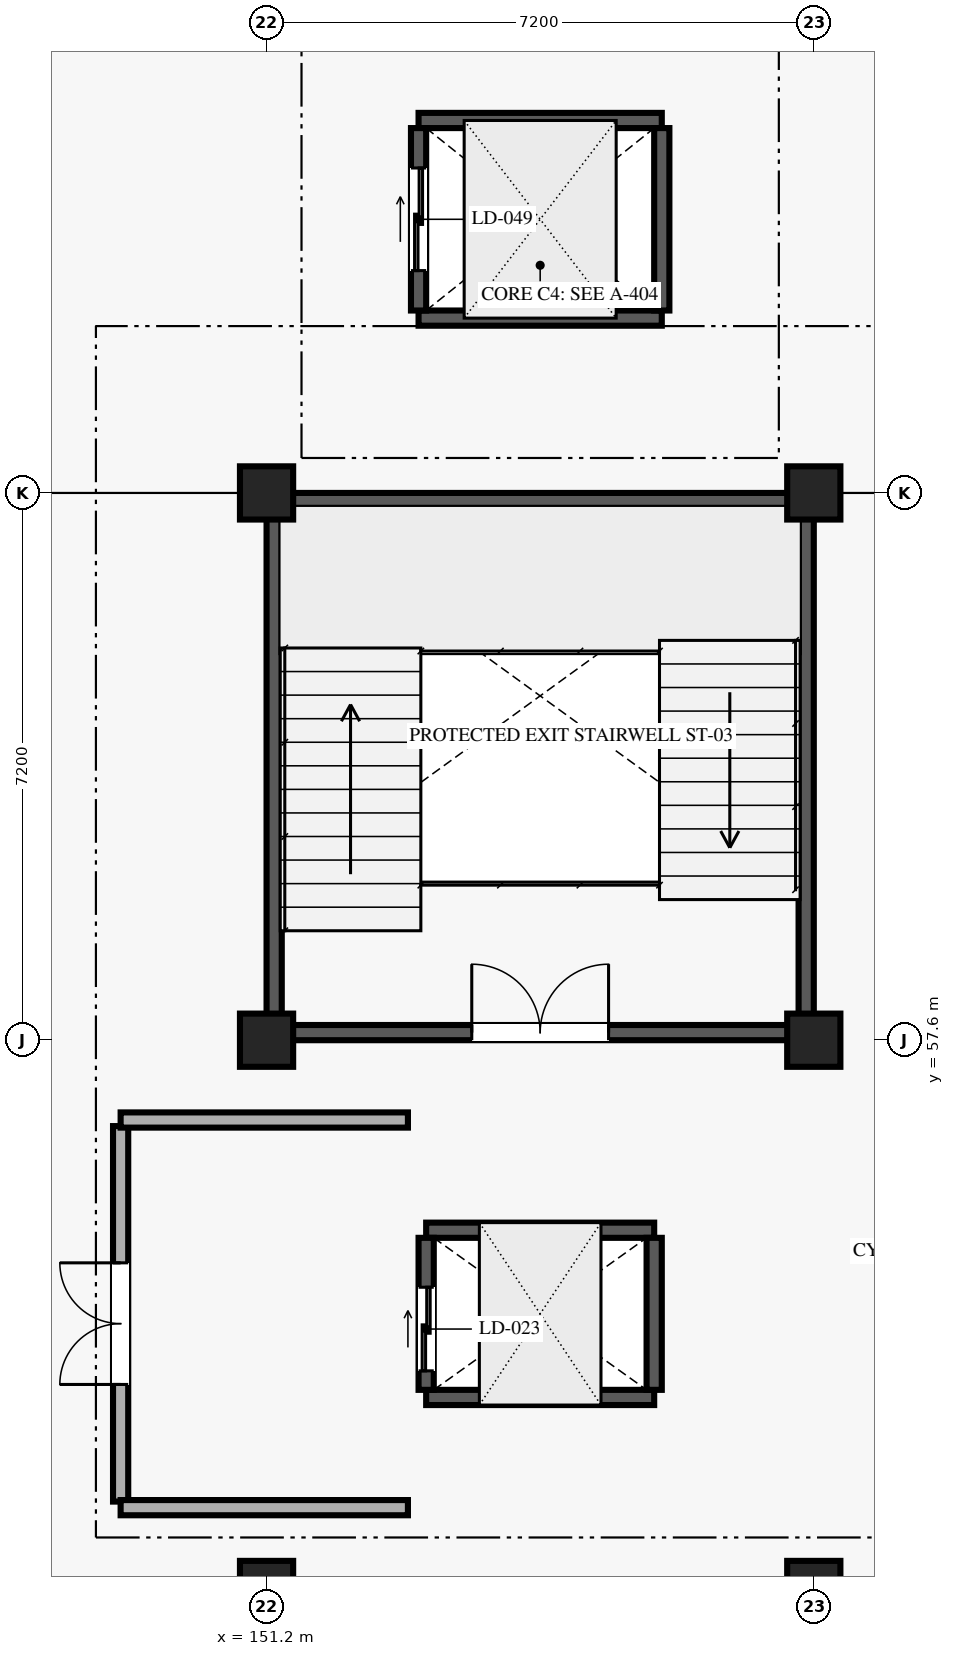
"""IFC4 building model, lengths in metres.
Left out: names, types, materials, properties, quantities, classifications, styles, units other than length and angle.
Written with IfcOpenShell. Run it as: python <this file> out.ifc"""

import sys

from ifc_helpers import new_model, si_unit, direction, frame, frame_2d, origin, origin_2d, place, context, subcontext, project, spatial, rectangle, extrude, element, fill, save


model = new_model("IFC4")
c1 = context("Model", 3, precision=1e-05, world=origin(), true_north=direction((0.0, 1.0)))
c2 = subcontext(c1, "Body", "Model", "MODEL_VIEW")
j1 = project(units=[si_unit("LENGTHUNIT", "METRE"), si_unit("PLANEANGLEUNIT", "RADIAN")], contexts=[c1])
p1 = place(None, origin())
s1 = spatial("IfcSite", under=j1, at=p1, CompositionType="ELEMENT")
p2 = place(p1, origin())
s2 = spatial("IfcBuilding", under=s1, at=p2, CompositionType="ELEMENT")
p3 = place(p2, frame((0.0, 0.0, 13.5)))
s3 = spatial("IfcBuildingStorey", under=s2, at=p3, CompositionType="ELEMENT", Elevation=13.5)
for number, where, z_axis, x_axis in (
    (1, (151.2, 50.4, 0.0), (0.0, 0.0, 1.0), (1.0, 0.0, 0.0)),
    (2, (151.2, 57.6, 0.0), (0.0, 0.0, 1.0), (1.0, 0.0, 0.0)),
    (3, (151.2, 64.8, 0.0), (0.0, 0.0, 1.0), (1.0, 0.0, 0.0)),
    (4, (158.4, 50.4, 0.0), (0.0, 0.0, 1.0), (1.0, 0.0, 0.0)),
    (5, (158.4, 57.6, 0.0), (0.0, 0.0, 1.0), (1.0, 0.0, 0.0)),
    (6, (158.4, 64.8, 0.0), (0.0, 0.0, 1.0), (1.0, 0.0, 0.0)),
):
    element("IfcColumn", number, at=place(p3, frame(where, z_axis=z_axis, x_axis=x_axis)), inside=s3, PredefinedType="COLUMN", context=c2, shape_type="SweptSolid", body=[
        extrude(rectangle(XDim=0.7, YDim=0.7, at=origin_2d()), origin(), (0.0, 0.0, 1.0), 4.05),
    ])
p4 = place(p3, frame((151.4, 57.7, 0.0), z_axis=(0.0, 0.0, 1.0), x_axis=(1.0, 0.0, 0.0)))
e7 = element("IfcWall", 7, at=p4, inside=s3, PredefinedType="SHEAR", context=c2, shape_type="SweptSolid", body=[
    extrude(rectangle(XDim=6.8, YDim=0.2, at=frame_2d((3.4, 0.0))), origin(), (0.0, 0.0, 1.0), 3.81),
])
p5 = place(p4, frame((2.5, 0.0, 0.0)))
e8 = element("IfcOpeningElement", 8, at=p5, cuts=e7, PredefinedType="OPENING", context=c2, shape_type="SweptSolid", body=[
    extrude(rectangle(XDim=1.8, YDim=2.2, at=frame_2d((0.9, 1.1))), frame((0.0, 0.11, 0.0), z_axis=(0.0, -1.0, 0.0), x_axis=(1.0, 0.0, 0.0)), (0.0, 0.0, 1.0), 0.22),
])
for number, where, z_axis, x_axis in (
    (9, (151.4, 64.7, 0.0), (0.0, 0.0, 1.0), (1.0, 0.0, 0.0)),
    (10, (151.3, 57.8, 0.0), (0.0, 0.0, 1.0), (0.0, 1.0, 0.0)),
    (11, (158.3, 57.8, 0.0), (0.0, 0.0, 1.0), (0.0, 1.0, 0.0)),
):
    element("IfcWall", number, at=place(p3, frame(where, z_axis=z_axis, x_axis=x_axis)), inside=s3, PredefinedType="SHEAR", context=c2, shape_type="SweptSolid", body=[
        extrude(rectangle(XDim=6.8, YDim=0.2, at=frame_2d((3.4, 0.0))), origin(), (0.0, 0.0, 1.0), 3.81),
    ])
for number, where, z_axis, x_axis in (
    (12, (153.3, 52.9, 0.0), (0.0, 0.0, 1.0), (1.0, 0.0, 0.0)),
    (13, (153.3, 55.1, 0.0), (0.0, 0.0, 1.0), (1.0, 0.0, 0.0)),
):
    element("IfcWall", number, at=place(p3, frame(where, z_axis=z_axis, x_axis=x_axis)), inside=s3, PredefinedType="SHEAR", context=c2, shape_type="SweptSolid", body=[
        extrude(rectangle(XDim=3.0, YDim=0.2, at=frame_2d((1.5, 0.0))), origin(), (0.0, 0.0, 1.0), 3.81),
    ])
p6 = place(p3, frame((153.3, 53.0, 0.0), z_axis=(0.0, 0.0, 1.0), x_axis=(0.0, 1.0, 0.0)))
e14 = element("IfcWall", 14, at=p6, inside=s3, PredefinedType="SHEAR", context=c2, shape_type="SweptSolid", body=[
    extrude(rectangle(XDim=2.0, YDim=0.2, at=frame_2d((1.0, 0.0))), origin(), (0.0, 0.0, 1.0), 3.81),
])
p7 = place(p6, frame((0.25, 0.0, 0.0)))
e15 = element("IfcOpeningElement", 15, at=p7, cuts=e14, PredefinedType="OPENING", context=c2, shape_type="SweptSolid", body=[
    extrude(rectangle(XDim=1.1, YDim=2.15, at=frame_2d((0.55, 1.075))), frame((0.0, 0.11, 0.0), z_axis=(0.0, -1.0, 0.0), x_axis=(1.0, 0.0, 0.0)), (0.0, 0.0, 1.0), 0.22),
])
p8 = place(p3, frame((156.3, 53.0, 0.0), z_axis=(0.0, 0.0, 1.0), x_axis=(0.0, 1.0, 0.0)))
e16 = element("IfcWall", 16, at=p8, inside=s3, PredefinedType="SHEAR", context=c2, shape_type="SweptSolid", body=[
    extrude(rectangle(XDim=2.0, YDim=0.2, at=frame_2d((1.0, 0.0))), origin(), (0.0, 0.0, 1.0), 3.81),
])
for number, where, z_axis, x_axis in (
    (17, (153.2, 67.1, 0.0), (0.0, 0.0, 1.0), (1.0, 0.0, 0.0)),
    (18, (153.2, 69.7, 0.0), (0.0, 0.0, 1.0), (1.0, 0.0, 0.0)),
):
    element("IfcWall", number, at=place(p3, frame(where, z_axis=z_axis, x_axis=x_axis)), inside=s3, PredefinedType="SHEAR", context=c2, shape_type="SweptSolid", body=[
        extrude(rectangle(XDim=3.2, YDim=0.2, at=frame_2d((1.6, 0.0))), origin(), (0.0, 0.0, 1.0), 3.81),
    ])
p9 = place(p3, frame((153.2, 67.2, 0.0), z_axis=(0.0, 0.0, 1.0), x_axis=(0.0, 1.0, 0.0)))
e19 = element("IfcWall", 19, at=p9, inside=s3, PredefinedType="SHEAR", context=c2, shape_type="SweptSolid", body=[
    extrude(rectangle(XDim=2.4, YDim=0.2, at=frame_2d((1.2, 0.0))), origin(), (0.0, 0.0, 1.0), 3.81),
])
p10 = place(p9, frame((0.525, 0.0, 0.0)))
e20 = element("IfcOpeningElement", 20, at=p10, cuts=e19, PredefinedType="OPENING", context=c2, shape_type="SweptSolid", body=[
    extrude(rectangle(XDim=1.35, YDim=2.2, at=frame_2d((0.675, 1.1))), frame((0.0, 0.11, 0.0), z_axis=(0.0, -1.0, 0.0), x_axis=(1.0, 0.0, 0.0)), (0.0, 0.0, 1.0), 0.22),
])
p11 = place(p3, frame((156.4, 67.2, 0.0), z_axis=(0.0, 0.0, 1.0), x_axis=(0.0, 1.0, 0.0)))
e21 = element("IfcWall", 21, at=p11, inside=s3, PredefinedType="SHEAR", context=c2, shape_type="SweptSolid", body=[
    extrude(rectangle(XDim=2.4, YDim=0.2, at=frame_2d((1.2, 0.0))), origin(), (0.0, 0.0, 1.0), 3.81),
])
p12 = place(p3, frame((149.28, 51.53, 0.0), z_axis=(0.0, 0.0, 1.0), x_axis=(0.0, 1.0, 0.0)))
e22 = element("IfcWall", 22, at=p12, inside=s3, PredefinedType="SOLIDWALL", context=c2, shape_type="SweptSolid", body=[
    extrude(rectangle(XDim=4.94, YDim=0.2, at=frame_2d((2.47, 0.0))), origin(), (0.0, 0.0, 1.0), 3.81),
])
p13 = place(p12, frame((1.541, 0.0, 0.0)))
e23 = element("IfcOpeningElement", 23, at=p13, cuts=e22, PredefinedType="OPENING", context=c2, shape_type="SweptSolid", body=[
    extrude(rectangle(XDim=1.6, YDim=2.2, at=frame_2d((0.8, 1.1))), frame((0.0, 0.11, 0.0), z_axis=(0.0, -1.0, 0.0), x_axis=(1.0, 0.0, 0.0)), (0.0, 0.0, 1.0), 0.22),
])
for number, where, z_axis, x_axis in (
    (24, (149.28, 51.45, 0.0), (0.0, 0.0, 1.0), (1.0, 0.0, 0.0)),
    (25, (149.28, 56.55, 0.0), (0.0, 0.0, 1.0), (1.0, 0.0, 0.0)),
):
    element("IfcWall", number, at=place(p3, frame(where, z_axis=z_axis, x_axis=x_axis)), inside=s3, PredefinedType="SOLIDWALL", context=c2, shape_type="SweptSolid", body=[
        extrude(rectangle(XDim=3.78, YDim=0.2, at=frame_2d((1.89, 0.0))), origin(), (0.0, 0.0, 1.0), 3.81),
    ])
p14 = place(p5, origin())
e26 = element("IfcDoor", 26, at=p14, inside=s3, OperationType="DOUBLE_DOOR_SINGLE_SWING", PredefinedType="DOOR", context=c2, shape_type="SweptSolid", body=[
    extrude(rectangle(XDim=1.8, YDim=2.2, at=frame_2d((0.9, 1.1))), frame((0.0, 0.025, 0.0), z_axis=(0.0, -1.0, 0.0), x_axis=(1.0, 0.0, 0.0)), (0.0, 0.0, 1.0), 0.05),
])
fill(e8, e26)
p15 = place(p7, origin())
e27 = element("IfcDoor", 27, at=p15, inside=s3, OperationType="DOUBLE_DOOR_SLIDING", PredefinedType="DOOR", context=c2, shape_type="SweptSolid", body=[
    extrude(rectangle(XDim=1.1, YDim=2.15, at=frame_2d((0.55, 1.075))), frame((0.0, 0.025, 0.0), z_axis=(0.0, -1.0, 0.0), x_axis=(1.0, 0.0, 0.0)), (0.0, 0.0, 1.0), 0.05),
])
fill(e15, e27)
p16 = place(p10, origin())
e28 = element("IfcDoor", 28, at=p16, inside=s3, OperationType="DOUBLE_DOOR_SLIDING", PredefinedType="DOOR", context=c2, shape_type="SweptSolid", body=[
    extrude(rectangle(XDim=1.35, YDim=2.2, at=frame_2d((0.675, 1.1))), frame((0.0, 0.025, 0.0), z_axis=(0.0, -1.0, 0.0), x_axis=(1.0, 0.0, 0.0)), (0.0, 0.0, 1.0), 0.05),
])
fill(e20, e28)
p17 = place(p13, origin())
e29 = element("IfcDoor", 29, at=p17, inside=s3, OperationType="DOUBLE_DOOR_SINGLE_SWING", PredefinedType="DOOR", context=c2, shape_type="SweptSolid", body=[
    extrude(rectangle(XDim=1.6, YDim=2.2, at=frame_2d((0.8, 1.1))), frame((0.0, 0.025, 0.0), z_axis=(0.0, -1.0, 0.0), x_axis=(1.0, 0.0, 0.0)), (0.0, 0.0, 1.0), 0.05),
])
fill(e23, e29)
save(model, sys.argv[1])
